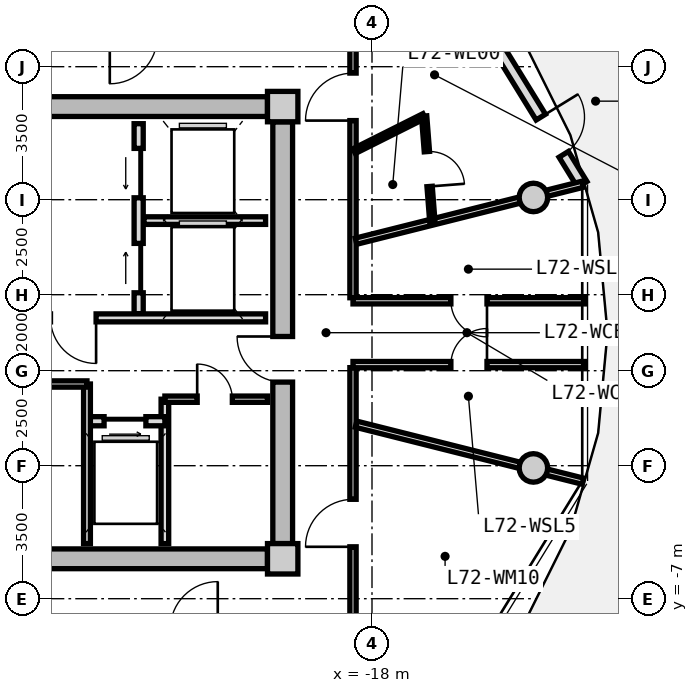
"""IFC4 building model, lengths in metres.
Left out: names, types, materials, properties, quantities, classifications, styles, units other than length and angle.
Written with IfcOpenShell. Run it as: python <this file> out.ifc"""

import sys

from ifc_helpers import new_model, si_unit, direction, frame, frame_2d, origin, origin_2d, place, context, subcontext, project, spatial, rectangle, circle, extrude, source, transform, mapped, element, fill, save


model = new_model("IFC4")
c1 = context("Model", 3, precision=1e-05, world=origin(), true_north=direction((0.0, 1.0)))
c2 = subcontext(c1, "Body", "Model", "MODEL_VIEW")
j1 = project(units=[si_unit("LENGTHUNIT", "METRE"), si_unit("PLANEANGLEUNIT", "RADIAN")], contexts=[c1])
p1 = place(None, origin())
s1 = spatial("IfcSite", under=j1, at=p1, CompositionType="ELEMENT")
p2 = place(p1, origin())
s2 = spatial("IfcBuilding", under=s1, at=p2, CompositionType="ELEMENT")
p3 = place(p2, frame((0.0, 0.0, 232.2)))
s3 = spatial("IfcBuildingStorey", under=s2, at=p3, CompositionType="ELEMENT", Elevation=232.2)
m1 = source(origin(), c2, "Body", "SweptSolid", [
    extrude(rectangle(XDim=0.8, YDim=0.8, at=origin_2d()), origin(), (0.0, 0.0, 1.0), 3.05),
])
for number, where, z_axis, x_axis in (
    (1, (-20.35, -5.95, 0.0), (0.0, 0.0, 1.0), (1.0, 0.0, 0.0)),
    (2, (-20.35, 5.95, 0.0), (0.0, 0.0, 1.0), (1.0, 0.0, 0.0)),
):
    element("IfcColumn", number, at=place(p3, frame(where, z_axis=z_axis, x_axis=x_axis)), inside=s3, PredefinedType="COLUMN", context=c2, shape_type="MappedRepresentation", body=[
        mapped(m1, transform((0.0, 0.0, 0.0), x_axis=(1.0, 0.0, 0.0), y_axis=(0.0, 1.0, 0.0), z_axis=(0.0, 0.0, 1.0), scale=1.0)),
    ])
m2 = source(origin(), c2, "Body", "SweptSolid", [
    extrude(rectangle(XDim=14.5, YDim=0.52, at=frame_2d((7.25, 0.0))), origin(), (0.0, 0.0, 1.0), 2.81),
])
for number, where, z_axis, x_axis in (
    (3, (-35.25, 5.95, 0.0), (0.0, 0.0, 1.0), (1.0, 0.0, 0.0)),
    (4, (-20.75, -5.95, 0.0), (0.0, 0.0, 1.0), (-1.0, 0.0, 0.0)),
):
    element("IfcWall", number, at=place(p3, frame(where, z_axis=z_axis, x_axis=x_axis)), inside=s3, PredefinedType="SHEAR", context=c2, shape_type="MappedRepresentation", body=[
        mapped(m2, transform((0.0, 0.0, 0.0), x_axis=(1.0, 0.0, 0.0), y_axis=(0.0, 1.0, 0.0), z_axis=(0.0, 0.0, 1.0), scale=1.0)),
    ])
m3 = source(origin(), c2, "Body", "SweptSolid", [
    extrude(rectangle(XDim=11.1, YDim=0.52, at=frame_2d((5.55, 0.0))), origin(), (0.0, 0.0, 1.0), 2.81),
])
p4 = place(p3, frame((-20.35, 5.55, 0.0), z_axis=(0.0, 0.0, 1.0), x_axis=(0.0, -1.0, 0.0)))
e5 = element("IfcWall", 5, at=p4, inside=s3, PredefinedType="SHEAR", context=c2, shape_type="MappedRepresentation", body=[
    mapped(m3, transform((0.0, 0.0, 0.0), x_axis=(1.0, 0.0, 0.0), y_axis=(0.0, 1.0, 0.0), z_axis=(0.0, 0.0, 1.0), scale=1.0)),
])
p5 = place(p4, frame((5.65, 0.0, 0.0)))
e6 = element("IfcOpeningElement", 6, at=p5, cuts=e5, PredefinedType="OPENING", context=c2, shape_type="SweptSolid", body=[
    extrude(rectangle(XDim=1.2, YDim=2.15, at=frame_2d((0.6, 1.075))), frame((0.0, 0.27, 0.0), z_axis=(0.0, -1.0, 0.0), x_axis=(1.0, 0.0, 0.0)), (0.0, 0.0, 1.0), 0.54),
])
m4 = source(origin(), c2, "Body", "SweptSolid", [
    extrude(circle(Radius=0.375, at=origin_2d()), origin(), (0.0, 0.0, 1.0), 3.05),
])
for number, where, z_axis, x_axis in (
    (7, (-13.753, 3.559, 0.0), (0.0, 0.0, 1.0), (1.0, 0.0, 0.0)),
    (8, (-13.753, -3.559, 0.0), (0.0, 0.0, 1.0), (1.0, 0.0, 0.0)),
):
    element("IfcColumn", number, at=place(p3, frame(where, z_axis=z_axis, x_axis=x_axis)), inside=s3, PredefinedType="COLUMN", context=c2, shape_type="MappedRepresentation", body=[
        mapped(m4, transform((0.0, 0.0, 0.0), x_axis=(1.0, 0.0, 0.0), y_axis=(0.0, 1.0, 0.0), z_axis=(0.0, 0.0, 1.0), scale=1.0)),
    ])
m5 = source(origin(), c2, "Body", "SweptSolid", [
    extrude(rectangle(XDim=7.938, YDim=0.29, at=frame_2d((3.969, 0.0))), origin(), (0.0, 0.0, 1.0), 2.81),
])
p6 = place(p3, frame((-16.63, 10.663, 0.0), z_axis=(0.0, 0.0, 1.0), x_axis=(0.524244987663, -0.851567491694, 0.0)))
e9 = element("IfcWall", 9, at=p6, inside=s3, PredefinedType="SOLIDWALL", context=c2, shape_type="MappedRepresentation", body=[
    mapped(m5, transform((0.0, 0.0, 0.0), x_axis=(1.0, 0.0, 0.0), y_axis=(0.0, 1.0, 0.0), z_axis=(0.0, 0.0, 1.0), scale=1.0)),
])
p7 = place(p6, frame((5.86, 0.0, 0.0)))
e10 = element("IfcOpeningElement", 10, at=p7, cuts=e9, PredefinedType="OPENING", context=c2, shape_type="SweptSolid", body=[
    extrude(rectangle(XDim=1.15, YDim=2.25, at=frame_2d((0.575, 1.125))), frame((0.0, 0.155, 0.0), z_axis=(0.0, -1.0, 0.0), x_axis=(1.0, 0.0, 0.0)), (0.0, 0.0, 1.0), 0.31),
])
p8 = place(p6, frame((0.85, 0.0, 0.85)))
e11 = element("IfcOpeningElement", 11, at=p8, cuts=e9, PredefinedType="OPENING", context=c2, shape_type="SweptSolid", body=[
    extrude(rectangle(XDim=1.2, YDim=1.5, at=frame_2d((0.6, 0.75))), frame((0.0, 0.155, 0.0), z_axis=(0.0, -1.0, 0.0), x_axis=(1.0, 0.0, 0.0)), (0.0, 0.0, 1.0), 0.31),
])
m6 = source(origin(), c2, "Body", "SweptSolid", [
    extrude(rectangle(XDim=5.0, YDim=0.24, at=frame_2d((2.5, 0.0))), origin(), (0.0, 0.0, 1.0), 2.795),
])
p9 = place(p3, frame((-24.14, 0.5, 0.0), z_axis=(0.0, 0.0, 1.0), x_axis=(0.0, 1.0, 0.0)))
e12 = element("IfcWall", 12, at=p9, inside=s3, PredefinedType="PARTITIONING", context=c2, shape_type="MappedRepresentation", body=[
    mapped(m6, transform((0.0, 0.0, 0.0), x_axis=(1.0, 0.0, 0.0), y_axis=(0.0, 1.0, 0.0), z_axis=(0.0, 0.0, 1.0), scale=1.0)),
])
p10 = place(p9, frame((3.05, 0.0, 0.0)))
e13 = element("IfcOpeningElement", 13, at=p10, cuts=e12, PredefinedType="OPENING", context=c2, shape_type="SweptSolid", body=[
    extrude(rectangle(XDim=1.3, YDim=2.2, at=frame_2d((0.65, 1.1))), frame((0.0, 0.13, 0.0), z_axis=(0.0, -1.0, 0.0), x_axis=(1.0, 0.0, 0.0)), (0.0, 0.0, 1.0), 0.26),
])
p11 = place(p9, frame((0.55, 0.0, 0.0)))
e14 = element("IfcOpeningElement", 14, at=p11, cuts=e12, PredefinedType="OPENING", context=c2, shape_type="SweptSolid", body=[
    extrude(rectangle(XDim=1.3, YDim=2.2, at=frame_2d((0.65, 1.1))), frame((0.0, 0.13, 0.0), z_axis=(0.0, -1.0, 0.0), x_axis=(1.0, 0.0, 0.0)), (0.0, 0.0, 1.0), 0.26),
])
m7 = source(origin(), c2, "Body", "SweptSolid", [
    extrude(rectangle(XDim=3.2, YDim=0.2, at=frame_2d((1.6, 0.0))), origin(), (0.0, 0.0, 1.0), 2.795),
])
p12 = place(p3, frame((-24.0, 2.95, 0.0), z_axis=(0.0, 0.0, 1.0), x_axis=(1.0, 0.0, 0.0)))
e15 = element("IfcWall", 15, at=p12, inside=s3, PredefinedType="PARTITIONING", context=c2, shape_type="MappedRepresentation", body=[
    mapped(m7, transform((0.0, 0.0, 0.0), x_axis=(1.0, 0.0, 0.0), y_axis=(0.0, 1.0, 0.0), z_axis=(0.0, 0.0, 1.0), scale=1.0)),
])
m8 = source(origin(), c2, "Body", "SweptSolid", [
    extrude(rectangle(XDim=6.66, YDim=0.21, at=frame_2d((3.33, 0.0))), origin(), (0.0, 0.0, 1.0), 2.795),
])
p13 = place(p3, frame((-27.46, 0.39, 0.0), z_axis=(0.0, 0.0, 1.0), x_axis=(1.0, 0.0, 0.0)))
e16 = element("IfcWall", 16, at=p13, inside=s3, PredefinedType="PARTITIONING", context=c2, shape_type="MappedRepresentation", body=[
    mapped(m8, transform((0.0, 0.0, 0.0), x_axis=(1.0, 0.0, 0.0), y_axis=(0.0, 1.0, 0.0), z_axis=(0.0, 0.0, 1.0), scale=1.0)),
])
p14 = place(p13, frame((1.0, 0.0, 0.0)))
e17 = element("IfcOpeningElement", 17, at=p14, cuts=e16, PredefinedType="OPENING", context=c2, shape_type="SweptSolid", body=[
    extrude(rectangle(XDim=1.2, YDim=2.15, at=frame_2d((0.6, 1.075))), frame((0.0, 0.115, 0.0), z_axis=(0.0, -1.0, 0.0), x_axis=(1.0, 0.0, 0.0)), (0.0, 0.0, 1.0), 0.23),
])
m9 = source(origin(), c2, "Body", "SweptSolid", [
    extrude(rectangle(XDim=3.8, YDim=0.2, at=frame_2d((1.9, 0.0))), origin(), (0.0, 0.0, 1.0), 2.795),
])
p15 = place(p3, frame((-23.45, -5.55, 0.0), z_axis=(0.0, 0.0, 1.0), x_axis=(0.0, 1.0, 0.0)))
e18 = element("IfcWall", 18, at=p15, inside=s3, PredefinedType="PARTITIONING", context=c2, shape_type="MappedRepresentation", body=[
    mapped(m9, transform((0.0, 0.0, 0.0), x_axis=(1.0, 0.0, 0.0), y_axis=(0.0, 1.0, 0.0), z_axis=(0.0, 0.0, 1.0), scale=1.0)),
])
m10 = source(origin(), c2, "Body", "SweptSolid", [
    extrude(rectangle(XDim=2.05, YDim=0.24, at=frame_2d((1.025, 0.0))), origin(), (0.0, 0.0, 1.0), 2.795),
])
p16 = place(p3, frame((-25.5, -2.33, 0.0), z_axis=(0.0, 0.0, 1.0), x_axis=(1.0, 0.0, 0.0)))
e19 = element("IfcWall", 19, at=p16, inside=s3, PredefinedType="PARTITIONING", context=c2, shape_type="MappedRepresentation", body=[
    mapped(m10, transform((0.0, 0.0, 0.0), x_axis=(1.0, 0.0, 0.0), y_axis=(0.0, 1.0, 0.0), z_axis=(0.0, 0.0, 1.0), scale=1.0)),
])
p17 = place(p16, frame((0.45, 0.0, 0.0)))
e20 = element("IfcOpeningElement", 20, at=p17, cuts=e19, PredefinedType="OPENING", context=c2, shape_type="SweptSolid", body=[
    extrude(rectangle(XDim=1.1, YDim=2.2, at=frame_2d((0.55, 1.1))), frame((0.0, 0.13, 0.0), z_axis=(0.0, -1.0, 0.0), x_axis=(1.0, 0.0, 0.0)), (0.0, 0.0, 1.0), 0.26),
])
m11 = source(origin(), c2, "Body", "SweptSolid", [
    extrude(rectangle(XDim=4.2, YDim=0.18, at=frame_2d((2.1, 0.0))), origin(), (0.0, 0.0, 1.0), 2.795),
])
p18 = place(p3, frame((-25.5, -5.55, 0.0), z_axis=(0.0, 0.0, 1.0), x_axis=(0.0, 1.0, 0.0)))
e21 = element("IfcWall", 21, at=p18, inside=s3, PredefinedType="PARTITIONING", context=c2, shape_type="MappedRepresentation", body=[
    mapped(m11, transform((0.0, 0.0, 0.0), x_axis=(1.0, 0.0, 0.0), y_axis=(0.0, 1.0, 0.0), z_axis=(0.0, 0.0, 1.0), scale=1.0)),
])
m12 = source(origin(), c2, "Body", "SweptSolid", [
    extrude(rectangle(XDim=4.77, YDim=0.165, at=frame_2d((2.385, 0.0))), origin(), (0.0, 0.0, 1.0), 2.795),
])
p19 = place(p3, frame((-30.27, -1.35, 0.0), z_axis=(0.0, 0.0, 1.0), x_axis=(1.0, 0.0, 0.0)))
e22 = element("IfcWall", 22, at=p19, inside=s3, PredefinedType="PARTITIONING", context=c2, shape_type="MappedRepresentation", body=[
    mapped(m12, transform((0.0, 0.0, 0.0), x_axis=(1.0, 0.0, 0.0), y_axis=(0.0, 1.0, 0.0), z_axis=(0.0, 0.0, 1.0), scale=1.0)),
])
p20 = place(p19, frame((1.85, 0.0, 0.0)))
e23 = element("IfcOpeningElement", 23, at=p20, cuts=e22, PredefinedType="OPENING", context=c2, shape_type="SweptSolid", body=[
    extrude(rectangle(XDim=1.0, YDim=2.1, at=frame_2d((0.5, 1.05))), frame((0.0, 0.093, 0.0), z_axis=(0.0, -1.0, 0.0), x_axis=(1.0, 0.0, 0.0)), (0.0, 0.0, 1.0), 0.185),
])
m13 = source(origin(), c2, "Body", "SweptSolid", [
    extrude(rectangle(XDim=2.7, YDim=0.165, at=frame_2d((1.35, 0.0))), origin(), (0.0, 0.0, 1.0), 2.795),
])
p21 = place(p3, frame((-23.45, -1.75, 0.0), z_axis=(0.0, 0.0, 1.0), x_axis=(1.0, 0.0, 0.0)))
e24 = element("IfcWall", 24, at=p21, inside=s3, PredefinedType="PARTITIONING", context=c2, shape_type="MappedRepresentation", body=[
    mapped(m13, transform((0.0, 0.0, 0.0), x_axis=(1.0, 0.0, 0.0), y_axis=(0.0, 1.0, 0.0), z_axis=(0.0, 0.0, 1.0), scale=1.0)),
])
p22 = place(p21, frame((0.85, 0.0, 0.0)))
e25 = element("IfcOpeningElement", 25, at=p22, cuts=e24, PredefinedType="OPENING", context=c2, shape_type="SweptSolid", body=[
    extrude(rectangle(XDim=0.925, YDim=2.1, at=frame_2d((0.462, 1.05))), frame((0.0, 0.093, 0.0), z_axis=(0.0, -1.0, 0.0), x_axis=(1.0, 0.0, 0.0)), (0.0, 0.0, 1.0), 0.185),
])
m14 = source(origin(), c2, "Body", "SweptSolid", [
    extrude(rectangle(XDim=6.88, YDim=0.165, at=frame_2d((3.44, 0.0))), origin(), (0.0, 0.0, 1.0), 2.795),
])
p23 = place(p3, frame((-18.5, 7.8, 0.0), z_axis=(0.0, 0.0, 1.0), x_axis=(0.0, -1.0, 0.0)))
e26 = element("IfcWall", 26, at=p23, inside=s3, PredefinedType="PARTITIONING", context=c2, shape_type="MappedRepresentation", body=[
    mapped(m14, transform((0.0, 0.0, 0.0), x_axis=(1.0, 0.0, 0.0), y_axis=(0.0, 1.0, 0.0), z_axis=(0.0, 0.0, 1.0), scale=1.0)),
])
p24 = place(p23, frame((0.968, 0.0, 0.0)))
e27 = element("IfcOpeningElement", 27, at=p24, cuts=e26, PredefinedType="OPENING", context=c2, shape_type="SweptSolid", body=[
    extrude(rectangle(XDim=1.25, YDim=2.2, at=frame_2d((0.625, 1.1))), frame((0.0, 0.093, 0.0), z_axis=(0.0, -1.0, 0.0), x_axis=(1.0, 0.0, 0.0)), (0.0, 0.0, 1.0), 0.185),
])
p25 = place(p3, frame((-18.5, -0.92, 0.0), z_axis=(0.0, 0.0, 1.0), x_axis=(0.0, -1.0, 0.0)))
e28 = element("IfcWall", 28, at=p25, inside=s3, PredefinedType="PARTITIONING", context=c2, shape_type="MappedRepresentation", body=[
    mapped(m14, transform((0.0, 0.0, 0.0), x_axis=(1.0, 0.0, 0.0), y_axis=(0.0, 1.0, 0.0), z_axis=(0.0, 0.0, 1.0), scale=1.0)),
])
p26 = place(p25, frame((3.464, 0.0, 0.0)))
e29 = element("IfcOpeningElement", 29, at=p26, cuts=e28, PredefinedType="OPENING", context=c2, shape_type="SweptSolid", body=[
    extrude(rectangle(XDim=1.25, YDim=2.2, at=frame_2d((0.625, 1.1))), frame((0.0, 0.093, 0.0), z_axis=(0.0, -1.0, 0.0), x_axis=(1.0, 0.0, 0.0)), (0.0, 0.0, 1.0), 0.185),
])
m15 = source(origin(), c2, "Body", "SweptSolid", [
    extrude(rectangle(XDim=6.157, YDim=0.165, at=frame_2d((3.079, 0.0))), origin(), (0.0, 0.0, 1.0), 2.395),
])
for number, where, z_axis, x_axis in (
    (30, (-18.42, -2.407, 0.0), (0.0, 0.0, 1.0), (0.97, -0.244, 0.0)),
    (31, (-18.42, 2.407, 0.0), (0.0, 0.0, 1.0), (0.97, 0.244, 0.0)),
):
    element("IfcWall", number, at=place(p3, frame(where, z_axis=z_axis, x_axis=x_axis)), inside=s3, PredefinedType="PARTITIONING", context=c2, shape_type="MappedRepresentation", body=[
        mapped(m15, transform((0.0, 0.0, 0.0), x_axis=(1.0, 0.0, 0.0), y_axis=(0.0, 1.0, 0.0), z_axis=(0.0, 0.0, 1.0), scale=1.0)),
    ])
m16 = source(origin(), c2, "Body", "SweptSolid", [
    extrude(rectangle(XDim=6.101, YDim=0.165, at=frame_2d((3.051, 0.0))), origin(), (0.0, 0.0, 1.0), 2.795),
])
p27 = place(p3, frame((-18.5, 0.84, 0.0), z_axis=(0.0, 0.0, 1.0), x_axis=(1.0, 0.0, 0.0)))
e32 = element("IfcWall", 32, at=p27, inside=s3, PredefinedType="PARTITIONING", context=c2, shape_type="MappedRepresentation", body=[
    mapped(m16, transform((0.0, 0.0, 0.0), x_axis=(1.0, 0.0, 0.0), y_axis=(0.0, 1.0, 0.0), z_axis=(0.0, 0.0, 1.0), scale=1.0)),
])
p28 = place(p27, frame((2.576, 0.0, 0.0)))
e33 = element("IfcOpeningElement", 33, at=p28, cuts=e32, PredefinedType="OPENING", context=c2, shape_type="SweptSolid", body=[
    extrude(rectangle(XDim=0.95, YDim=2.1, at=frame_2d((0.475, 1.05))), frame((0.0, 0.093, 0.0), z_axis=(0.0, -1.0, 0.0), x_axis=(1.0, 0.0, 0.0)), (0.0, 0.0, 1.0), 0.185),
])
p29 = place(p3, frame((-12.399, -0.84, 0.0), z_axis=(0.0, 0.0, 1.0), x_axis=(-1.0, 0.0, 0.0)))
e34 = element("IfcWall", 34, at=p29, inside=s3, PredefinedType="PARTITIONING", context=c2, shape_type="MappedRepresentation", body=[
    mapped(m16, transform((0.0, 0.0, 0.0), x_axis=(1.0, 0.0, 0.0), y_axis=(0.0, 1.0, 0.0), z_axis=(0.0, 0.0, 1.0), scale=1.0)),
])
p30 = place(p29, frame((2.576, 0.0, 0.0)))
e35 = element("IfcOpeningElement", 35, at=p30, cuts=e34, PredefinedType="OPENING", context=c2, shape_type="SweptSolid", body=[
    extrude(rectangle(XDim=0.95, YDim=2.1, at=frame_2d((0.475, 1.05))), frame((0.0, 0.093, 0.0), z_axis=(0.0, -1.0, 0.0), x_axis=(1.0, 0.0, 0.0)), (0.0, 0.0, 1.0), 0.185),
])
m17 = source(origin(), c2, "Body", "SweptSolid", [
    extrude(rectangle(XDim=2.06, YDim=0.14, at=frame_2d((1.03, 0.0))), origin(), (0.0, 0.0, 1.0), 2.795),
])
p31 = place(p3, frame((-18.47, 4.778, 0.0), z_axis=(0.0, 0.0, 1.0), x_axis=(0.893952568722, 0.448161583444, 0.0)))
e36 = element("IfcWall", 36, at=p31, inside=s3, PredefinedType="PARTITIONING", context=c2, shape_type="MappedRepresentation", body=[
    mapped(m17, transform((0.0, 0.0, 0.0), x_axis=(1.0, 0.0, 0.0), y_axis=(0.0, 1.0, 0.0), z_axis=(0.0, 0.0, 1.0), scale=1.0)),
])
m18 = source(origin(), c2, "Body", "SweptSolid", [
    extrude(rectangle(XDim=2.798, YDim=0.14, at=frame_2d((1.399, 0.0))), origin(), (0.0, 0.0, 1.0), 2.795),
])
p32 = place(p3, frame((-16.629, 5.701, 0.0), z_axis=(0.0, 0.0, 1.0), x_axis=(0.077823984089, -0.996967114553, 0.0)))
e37 = element("IfcWall", 37, at=p32, inside=s3, PredefinedType="PARTITIONING", context=c2, shape_type="MappedRepresentation", body=[
    mapped(m18, transform((0.0, 0.0, 0.0), x_axis=(1.0, 0.0, 0.0), y_axis=(0.0, 1.0, 0.0), z_axis=(0.0, 0.0, 1.0), scale=1.0)),
])
p33 = place(p32, frame((0.939, 0.0, 0.0)))
e38 = element("IfcOpeningElement", 38, at=p33, cuts=e37, PredefinedType="OPENING", context=c2, shape_type="SweptSolid", body=[
    extrude(rectangle(XDim=0.92, YDim=2.1, at=frame_2d((0.46, 1.05))), frame((0.0, 0.08, 0.0), z_axis=(0.0, -1.0, 0.0), x_axis=(1.0, 0.0, 0.0)), (0.0, 0.0, 1.0), 0.16),
])
m19 = source(origin(), c2, "Body", "SweptSolid", [
    extrude(rectangle(XDim=1.15, YDim=2.25, at=frame_2d((0.575, 1.125))), frame((0.0, 0.025, 0.0), z_axis=(0.0, -1.0, 0.0), x_axis=(1.0, 0.0, 0.0)), (0.0, 0.0, 1.0), 0.05),
])
p34 = place(p7, origin())
e39 = element("IfcDoor", 39, at=p34, inside=s3, OperationType="SINGLE_SWING_LEFT", PredefinedType="DOOR", context=c2, shape_type="MappedRepresentation", body=[
    mapped(m19, transform((0.0, 0.0, 0.0), x_axis=(1.0, 0.0, 0.0), y_axis=(0.0, 1.0, 0.0), z_axis=(0.0, 0.0, 1.0), scale=1.0)),
])
fill(e10, e39)
m20 = source(origin(), c2, "Body", "SweptSolid", [
    extrude(rectangle(XDim=1.3, YDim=2.2, at=frame_2d((0.65, 1.1))), frame((0.0, 0.025, 0.0), z_axis=(0.0, -1.0, 0.0), x_axis=(1.0, 0.0, 0.0)), (0.0, 0.0, 1.0), 0.05),
])
p35 = place(p10, origin())
e40 = element("IfcDoor", 40, at=p35, inside=s3, OperationType="SLIDING_TO_LEFT", PredefinedType="DOOR", context=c2, shape_type="MappedRepresentation", body=[
    mapped(m20, transform((0.0, 0.0, 0.0), x_axis=(1.0, 0.0, 0.0), y_axis=(0.0, 1.0, 0.0), z_axis=(0.0, 0.0, 1.0), scale=1.0)),
])
fill(e13, e40)
p36 = place(p11, origin())
e41 = element("IfcDoor", 41, at=p36, inside=s3, OperationType="SLIDING_TO_RIGHT", PredefinedType="DOOR", context=c2, shape_type="MappedRepresentation", body=[
    mapped(m20, transform((0.0, 0.0, 0.0), x_axis=(1.0, 0.0, 0.0), y_axis=(0.0, 1.0, 0.0), z_axis=(0.0, 0.0, 1.0), scale=1.0)),
])
fill(e14, e41)
m21 = source(origin(), c2, "Body", "SweptSolid", [
    extrude(rectangle(XDim=1.2, YDim=2.15, at=frame_2d((0.6, 1.075))), frame((0.0, 0.025, 0.0), z_axis=(0.0, -1.0, 0.0), x_axis=(1.0, 0.0, 0.0)), (0.0, 0.0, 1.0), 0.05),
])
p37 = place(p14, frame((1.2, 0.0, 0.0), z_axis=(0.0, 0.0, 1.0), x_axis=(-1.0, 0.0, 0.0)))
e42 = element("IfcDoor", 42, at=p37, inside=s3, OperationType="SINGLE_SWING_LEFT", PredefinedType="DOOR", context=c2, shape_type="MappedRepresentation", body=[
    mapped(m21, transform((0.0, 0.0, 0.0), x_axis=(1.0, 0.0, 0.0), y_axis=(0.0, 1.0, 0.0), z_axis=(0.0, 0.0, 1.0), scale=1.0)),
])
fill(e17, e42)
p38 = place(p5, frame((1.2, 0.0, 0.0), z_axis=(0.0, 0.0, 1.0), x_axis=(-1.0, 0.0, 0.0)))
e43 = element("IfcDoor", 43, at=p38, inside=s3, OperationType="SINGLE_SWING_RIGHT", PredefinedType="DOOR", context=c2, shape_type="MappedRepresentation", body=[
    mapped(m21, transform((0.0, 0.0, 0.0), x_axis=(1.0, 0.0, 0.0), y_axis=(0.0, 1.0, 0.0), z_axis=(0.0, 0.0, 1.0), scale=1.0)),
])
fill(e6, e43)
m22 = source(origin(), c2, "Body", "SweptSolid", [
    extrude(rectangle(XDim=1.1, YDim=2.2, at=frame_2d((0.55, 1.1))), frame((0.0, 0.025, 0.0), z_axis=(0.0, -1.0, 0.0), x_axis=(1.0, 0.0, 0.0)), (0.0, 0.0, 1.0), 0.05),
])
p39 = place(p17, frame((1.1, 0.0, 0.0), z_axis=(0.0, 0.0, 1.0), x_axis=(-1.0, 0.0, 0.0)))
e44 = element("IfcDoor", 44, at=p39, inside=s3, OperationType="SLIDING_TO_RIGHT", PredefinedType="DOOR", context=c2, shape_type="MappedRepresentation", body=[
    mapped(m22, transform((0.0, 0.0, 0.0), x_axis=(1.0, 0.0, 0.0), y_axis=(0.0, 1.0, 0.0), z_axis=(0.0, 0.0, 1.0), scale=1.0)),
])
fill(e20, e44)
m23 = source(origin(), c2, "Body", "SweptSolid", [
    extrude(rectangle(XDim=0.925, YDim=2.1, at=frame_2d((0.462, 1.05))), frame((0.0, 0.025, 0.0), z_axis=(0.0, -1.0, 0.0), x_axis=(1.0, 0.0, 0.0)), (0.0, 0.0, 1.0), 0.05),
])
p40 = place(p22, origin())
e45 = element("IfcDoor", 45, at=p40, inside=s3, OperationType="SINGLE_SWING_LEFT", PredefinedType="DOOR", context=c2, shape_type="MappedRepresentation", body=[
    mapped(m23, transform((0.0, 0.0, 0.0), x_axis=(1.0, 0.0, 0.0), y_axis=(0.0, 1.0, 0.0), z_axis=(0.0, 0.0, 1.0), scale=1.0)),
])
fill(e25, e45)
m24 = source(origin(), c2, "Body", "SweptSolid", [
    extrude(rectangle(XDim=0.95, YDim=2.1, at=frame_2d((0.475, 1.05))), frame((0.0, 0.025, 0.0), z_axis=(0.0, -1.0, 0.0), x_axis=(1.0, 0.0, 0.0)), (0.0, 0.0, 1.0), 0.05),
])
p41 = place(p30, frame((0.95, 0.0, 0.0), z_axis=(0.0, 0.0, 1.0), x_axis=(-1.0, 0.0, 0.0)))
e46 = element("IfcDoor", 46, at=p41, inside=s3, OperationType="SINGLE_SWING_RIGHT", PredefinedType="DOOR", context=c2, shape_type="MappedRepresentation", body=[
    mapped(m24, transform((0.0, 0.0, 0.0), x_axis=(1.0, 0.0, 0.0), y_axis=(0.0, 1.0, 0.0), z_axis=(0.0, 0.0, 1.0), scale=1.0)),
])
fill(e35, e46)
p42 = place(p28, frame((0.95, 0.0, 0.0), z_axis=(0.0, 0.0, 1.0), x_axis=(-1.0, 0.0, 0.0)))
e47 = element("IfcDoor", 47, at=p42, inside=s3, OperationType="SINGLE_SWING_LEFT", PredefinedType="DOOR", context=c2, shape_type="MappedRepresentation", body=[
    mapped(m24, transform((0.0, 0.0, 0.0), x_axis=(1.0, 0.0, 0.0), y_axis=(0.0, 1.0, 0.0), z_axis=(0.0, 0.0, 1.0), scale=1.0)),
])
fill(e33, e47)
m25 = source(origin(), c2, "Body", "SweptSolid", [
    extrude(rectangle(XDim=1.25, YDim=2.2, at=frame_2d((0.625, 1.1))), frame((0.0, 0.025, 0.0), z_axis=(0.0, -1.0, 0.0), x_axis=(1.0, 0.0, 0.0)), (0.0, 0.0, 1.0), 0.05),
])
p43 = place(p24, frame((1.25, 0.0, 0.0), z_axis=(0.0, 0.0, 1.0), x_axis=(-1.0, 0.0, 0.0)))
e48 = element("IfcDoor", 48, at=p43, inside=s3, OperationType="SINGLE_SWING_LEFT", PredefinedType="DOOR", context=c2, shape_type="MappedRepresentation", body=[
    mapped(m25, transform((0.0, 0.0, 0.0), x_axis=(1.0, 0.0, 0.0), y_axis=(0.0, 1.0, 0.0), z_axis=(0.0, 0.0, 1.0), scale=1.0)),
])
fill(e27, e48)
m26 = source(origin(), c2, "Body", "SweptSolid", [
    extrude(rectangle(XDim=0.92, YDim=2.1, at=frame_2d((0.46, 1.05))), frame((0.0, 0.025, 0.0), z_axis=(0.0, -1.0, 0.0), x_axis=(1.0, 0.0, 0.0)), (0.0, 0.0, 1.0), 0.05),
])
p44 = place(p33, origin())
e49 = element("IfcDoor", 49, at=p44, inside=s3, OperationType="SINGLE_SWING_RIGHT", PredefinedType="DOOR", context=c2, shape_type="MappedRepresentation", body=[
    mapped(m26, transform((0.0, 0.0, 0.0), x_axis=(1.0, 0.0, 0.0), y_axis=(0.0, 1.0, 0.0), z_axis=(0.0, 0.0, 1.0), scale=1.0)),
])
fill(e38, e49)
p45 = place(p26, frame((1.25, 0.0, 0.0), z_axis=(0.0, 0.0, 1.0), x_axis=(-1.0, 0.0, 0.0)))
e50 = element("IfcDoor", 50, at=p45, inside=s3, OperationType="SINGLE_SWING_LEFT", PredefinedType="DOOR", context=c2, shape_type="MappedRepresentation", body=[
    mapped(m25, transform((0.0, 0.0, 0.0), x_axis=(1.0, 0.0, 0.0), y_axis=(0.0, 1.0, 0.0), z_axis=(0.0, 0.0, 1.0), scale=1.0)),
])
fill(e29, e50)
save(model, sys.argv[1])
